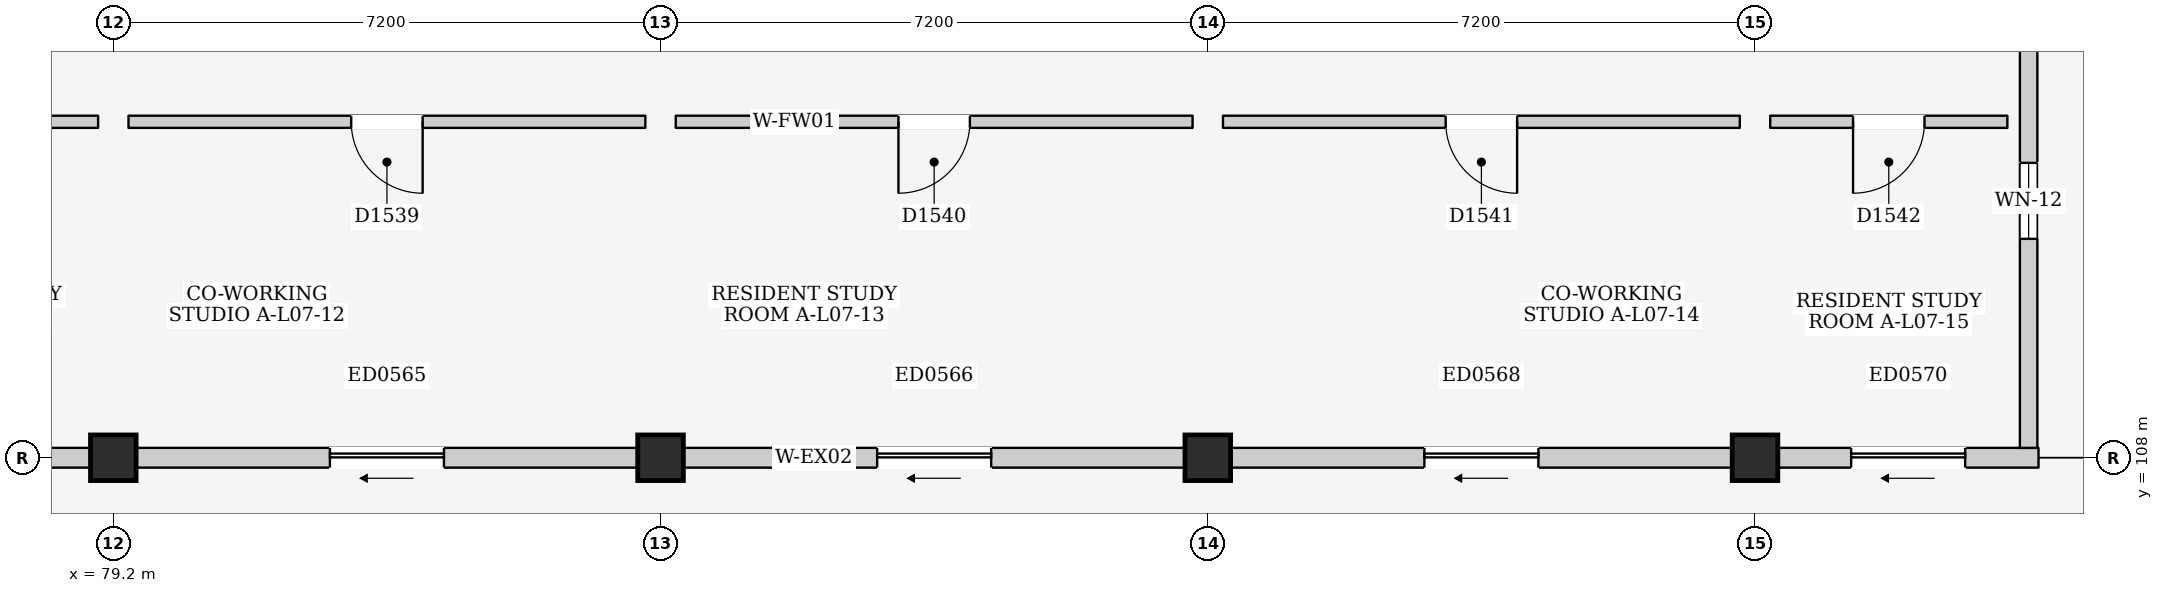
"""IFC4 building model, lengths in metres.
Left out: names, types, materials, properties, quantities, classifications, styles, units other than length and angle.
Written with IfcOpenShell. Run it as: python <this file> out.ifc"""

import sys

from ifc_helpers import new_model, si_unit, direction, frame, frame_2d, origin, origin_2d, place, context, subcontext, project, spatial, rectangle, extrude, element, fill, save


model = new_model("IFC4")
c1 = context("Model", 3, precision=1e-05, world=origin(), true_north=direction((0.0, 1.0)))
c2 = subcontext(c1, "Body", "Model", "MODEL_VIEW")
j1 = project(units=[si_unit("LENGTHUNIT", "METRE"), si_unit("PLANEANGLEUNIT", "RADIAN")], contexts=[c1])
p1 = place(None, origin())
s1 = spatial("IfcSite", under=j1, at=p1, CompositionType="ELEMENT")
p2 = place(p1, origin())
s2 = spatial("IfcBuilding", under=s1, at=p2, CompositionType="ELEMENT")
p3 = place(p2, frame((0.0, 0.0, 25.1)))
s3 = spatial("IfcBuildingStorey", under=s2, at=p3, CompositionType="ELEMENT", Elevation=25.1)
for number, where, z_axis, x_axis in (
    (1, (79.2, 108.0, 0.0), (0.0, 0.0, 1.0), (1.0, 0.0, 0.0)),
    (2, (86.4, 108.0, 0.0), (0.0, 0.0, 1.0), (1.0, 0.0, 0.0)),
    (3, (93.6, 108.0, 0.0), (0.0, 0.0, 1.0), (1.0, 0.0, 0.0)),
    (4, (100.8, 108.0, 0.0), (0.0, 0.0, 1.0), (1.0, 0.0, 0.0)),
):
    element("IfcColumn", number, at=place(p3, frame(where, z_axis=z_axis, x_axis=x_axis)), inside=s3, PredefinedType="COLUMN", context=c2, shape_type="SweptSolid", body=[
        extrude(rectangle(XDim=0.6, YDim=0.6, at=origin_2d()), origin(), (0.0, 0.0, 1.0), 3.2),
    ])
p4 = place(p3, frame((72.3, 108.0, 0.0), z_axis=(0.0, 0.0, 1.0), x_axis=(1.0, 0.0, 0.0)))
e5 = element("IfcWall", 5, at=p4, inside=s3, PredefinedType="ELEMENTEDWALL", context=c2, shape_type="SweptSolid", body=[
    extrude(rectangle(XDim=6.6, YDim=0.26, at=frame_2d((3.3, 0.0))), origin(), (0.0, 0.0, 1.0), 2.325),
])
p5 = place(p4, frame((2.55, 0.0, 0.0)))
e6 = element("IfcOpeningElement", 6, at=p5, cuts=e5, PredefinedType="OPENING", context=c2, shape_type="SweptSolid", body=[
    extrude(rectangle(XDim=1.5, YDim=2.12, at=frame_2d((0.75, 1.06))), frame((0.0, 0.145, 0.0), z_axis=(0.0, -1.0, 0.0), x_axis=(1.0, 0.0, 0.0)), (0.0, 0.0, 1.0), 0.29),
])
p6 = place(p3, frame((79.5, 108.0, 0.0), z_axis=(0.0, 0.0, 1.0), x_axis=(1.0, 0.0, 0.0)))
e7 = element("IfcWall", 7, at=p6, inside=s3, PredefinedType="ELEMENTEDWALL", context=c2, shape_type="SweptSolid", body=[
    extrude(rectangle(XDim=6.6, YDim=0.26, at=frame_2d((3.3, 0.0))), origin(), (0.0, 0.0, 1.0), 2.325),
])
p7 = place(p6, frame((2.55, 0.0, 0.0)))
e8 = element("IfcOpeningElement", 8, at=p7, cuts=e7, PredefinedType="OPENING", context=c2, shape_type="SweptSolid", body=[
    extrude(rectangle(XDim=1.5, YDim=2.12, at=frame_2d((0.75, 1.06))), frame((0.0, 0.145, 0.0), z_axis=(0.0, -1.0, 0.0), x_axis=(1.0, 0.0, 0.0)), (0.0, 0.0, 1.0), 0.29),
])
p8 = place(p3, frame((86.7, 108.0, 0.0), z_axis=(0.0, 0.0, 1.0), x_axis=(1.0, 0.0, 0.0)))
e9 = element("IfcWall", 9, at=p8, inside=s3, PredefinedType="ELEMENTEDWALL", context=c2, shape_type="SweptSolid", body=[
    extrude(rectangle(XDim=6.6, YDim=0.26, at=frame_2d((3.3, 0.0))), origin(), (0.0, 0.0, 1.0), 2.325),
])
p9 = place(p8, frame((2.55, 0.0, 0.0)))
e10 = element("IfcOpeningElement", 10, at=p9, cuts=e9, PredefinedType="OPENING", context=c2, shape_type="SweptSolid", body=[
    extrude(rectangle(XDim=1.5, YDim=2.12, at=frame_2d((0.75, 1.06))), frame((0.0, 0.145, 0.0), z_axis=(0.0, -1.0, 0.0), x_axis=(1.0, 0.0, 0.0)), (0.0, 0.0, 1.0), 0.29),
])
p10 = place(p3, frame((93.9, 108.0, 0.0), z_axis=(0.0, 0.0, 1.0), x_axis=(1.0, 0.0, 0.0)))
e11 = element("IfcWall", 11, at=p10, inside=s3, PredefinedType="ELEMENTEDWALL", context=c2, shape_type="SweptSolid", body=[
    extrude(rectangle(XDim=6.6, YDim=0.26, at=frame_2d((3.3, 0.0))), origin(), (0.0, 0.0, 1.0), 2.325),
])
p11 = place(p10, frame((2.55, 0.0, 0.0)))
e12 = element("IfcOpeningElement", 12, at=p11, cuts=e11, PredefinedType="OPENING", context=c2, shape_type="SweptSolid", body=[
    extrude(rectangle(XDim=1.5, YDim=2.12, at=frame_2d((0.75, 1.06))), frame((0.0, 0.145, 0.0), z_axis=(0.0, -1.0, 0.0), x_axis=(1.0, 0.0, 0.0)), (0.0, 0.0, 1.0), 0.29),
])
p12 = place(p3, frame((101.1, 108.0, 0.0), z_axis=(0.0, 0.0, 1.0), x_axis=(1.0, 0.0, 0.0)))
e13 = element("IfcWall", 13, at=p12, inside=s3, PredefinedType="ELEMENTEDWALL", context=c2, shape_type="SweptSolid", body=[
    extrude(rectangle(XDim=3.43, YDim=0.26, at=frame_2d((1.715, 0.0))), origin(), (0.0, 0.0, 1.0), 2.325),
])
p13 = place(p12, frame((0.965, 0.0, 0.0)))
e14 = element("IfcOpeningElement", 14, at=p13, cuts=e13, PredefinedType="OPENING", context=c2, shape_type="SweptSolid", body=[
    extrude(rectangle(XDim=1.5, YDim=2.12, at=frame_2d((0.75, 1.06))), frame((0.0, 0.145, 0.0), z_axis=(0.0, -1.0, 0.0), x_axis=(1.0, 0.0, 0.0)), (0.0, 0.0, 1.0), 0.29),
])
p14 = place(p3, frame((104.4, 108.13, 0.0), z_axis=(0.0, 0.0, 1.0), x_axis=(0.0, 1.0, 0.0)))
e15 = element("IfcWall", 15, at=p14, inside=s3, PredefinedType="ELEMENTEDWALL", context=c2, shape_type="SweptSolid", body=[
    extrude(rectangle(XDim=7.07, YDim=0.23, at=frame_2d((3.535, 0.0))), origin(), (0.0, 0.0, 1.0), 2.425),
])
p15 = place(p14, frame((2.75, 0.0, 1.1)))
e16 = element("IfcOpeningElement", 16, at=p15, cuts=e15, PredefinedType="OPENING", context=c2, shape_type="SweptSolid", body=[
    extrude(rectangle(XDim=1.0, YDim=0.9, at=frame_2d((0.5, 0.45))), frame((0.0, 0.13, 0.0), z_axis=(0.0, -1.0, 0.0), x_axis=(1.0, 0.0, 0.0)), (0.0, 0.0, 1.0), 0.26),
])
p16 = place(p3, frame((72.2, 112.42, 0.0), z_axis=(0.0, 0.0, 1.0), x_axis=(1.0, 0.0, 0.0)))
e17 = element("IfcWall", 17, at=p16, inside=s3, PredefinedType="PARTITIONING", context=c2, shape_type="SweptSolid", body=[
    extrude(rectangle(XDim=6.8, YDim=0.16, at=frame_2d((3.4, 0.0))), origin(), (0.0, 0.0, 1.0), 2.99),
])
p17 = place(p16, frame((2.93, 0.0, 0.0)))
e18 = element("IfcOpeningElement", 18, at=p17, cuts=e17, PredefinedType="OPENING", context=c2, shape_type="SweptSolid", body=[
    extrude(rectangle(XDim=0.94, YDim=2.12, at=frame_2d((0.47, 1.06))), frame((0.0, 0.095, 0.0), z_axis=(0.0, -1.0, 0.0), x_axis=(1.0, 0.0, 0.0)), (0.0, 0.0, 1.0), 0.19),
])
p18 = place(p3, frame((79.4, 112.42, 0.0), z_axis=(0.0, 0.0, 1.0), x_axis=(1.0, 0.0, 0.0)))
e19 = element("IfcWall", 19, at=p18, inside=s3, PredefinedType="PARTITIONING", context=c2, shape_type="SweptSolid", body=[
    extrude(rectangle(XDim=6.8, YDim=0.16, at=frame_2d((3.4, 0.0))), origin(), (0.0, 0.0, 1.0), 2.99),
])
p19 = place(p18, frame((2.93, 0.0, 0.0)))
e20 = element("IfcOpeningElement", 20, at=p19, cuts=e19, PredefinedType="OPENING", context=c2, shape_type="SweptSolid", body=[
    extrude(rectangle(XDim=0.94, YDim=2.12, at=frame_2d((0.47, 1.06))), frame((0.0, 0.095, 0.0), z_axis=(0.0, -1.0, 0.0), x_axis=(1.0, 0.0, 0.0)), (0.0, 0.0, 1.0), 0.19),
])
p20 = place(p3, frame((86.6, 112.42, 0.0), z_axis=(0.0, 0.0, 1.0), x_axis=(1.0, 0.0, 0.0)))
e21 = element("IfcWall", 21, at=p20, inside=s3, PredefinedType="PARTITIONING", context=c2, shape_type="SweptSolid", body=[
    extrude(rectangle(XDim=6.8, YDim=0.16, at=frame_2d((3.4, 0.0))), origin(), (0.0, 0.0, 1.0), 2.99),
])
p21 = place(p20, frame((2.93, 0.0, 0.0)))
e22 = element("IfcOpeningElement", 22, at=p21, cuts=e21, PredefinedType="OPENING", context=c2, shape_type="SweptSolid", body=[
    extrude(rectangle(XDim=0.94, YDim=2.12, at=frame_2d((0.47, 1.06))), frame((0.0, 0.095, 0.0), z_axis=(0.0, -1.0, 0.0), x_axis=(1.0, 0.0, 0.0)), (0.0, 0.0, 1.0), 0.19),
])
p22 = place(p3, frame((93.8, 112.42, 0.0), z_axis=(0.0, 0.0, 1.0), x_axis=(1.0, 0.0, 0.0)))
e23 = element("IfcWall", 23, at=p22, inside=s3, PredefinedType="PARTITIONING", context=c2, shape_type="SweptSolid", body=[
    extrude(rectangle(XDim=6.8, YDim=0.16, at=frame_2d((3.4, 0.0))), origin(), (0.0, 0.0, 1.0), 2.99),
])
p23 = place(p22, frame((2.93, 0.0, 0.0)))
e24 = element("IfcOpeningElement", 24, at=p23, cuts=e23, PredefinedType="OPENING", context=c2, shape_type="SweptSolid", body=[
    extrude(rectangle(XDim=0.94, YDim=2.12, at=frame_2d((0.47, 1.06))), frame((0.0, 0.095, 0.0), z_axis=(0.0, -1.0, 0.0), x_axis=(1.0, 0.0, 0.0)), (0.0, 0.0, 1.0), 0.19),
])
p24 = place(p3, frame((101.0, 112.42, 0.0), z_axis=(0.0, 0.0, 1.0), x_axis=(1.0, 0.0, 0.0)))
e25 = element("IfcWall", 25, at=p24, inside=s3, PredefinedType="PARTITIONING", context=c2, shape_type="SweptSolid", body=[
    extrude(rectangle(XDim=3.12, YDim=0.16, at=frame_2d((1.56, 0.0))), origin(), (0.0, 0.0, 1.0), 2.99),
])
p25 = place(p24, frame((1.09, 0.0, 0.0)))
e26 = element("IfcOpeningElement", 26, at=p25, cuts=e25, PredefinedType="OPENING", context=c2, shape_type="SweptSolid", body=[
    extrude(rectangle(XDim=0.94, YDim=2.12, at=frame_2d((0.47, 1.06))), frame((0.0, 0.095, 0.0), z_axis=(0.0, -1.0, 0.0), x_axis=(1.0, 0.0, 0.0)), (0.0, 0.0, 1.0), 0.19),
])
p26 = place(p7, frame((1.5, 0.0, 0.0), z_axis=(0.0, 0.0, 1.0), x_axis=(-1.0, 0.0, 0.0)))
e27 = element("IfcDoor", 27, at=p26, inside=s3, OperationType="SLIDING_TO_LEFT", PredefinedType="DOOR", context=c2, shape_type="SweptSolid", body=[
    extrude(rectangle(XDim=1.5, YDim=2.12, at=frame_2d((0.75, 1.06))), frame((0.0, 0.025, 0.0), z_axis=(0.0, -1.0, 0.0), x_axis=(1.0, 0.0, 0.0)), (0.0, 0.0, 1.0), 0.05),
])
fill(e8, e27)
p27 = place(p9, frame((1.5, 0.0, 0.0), z_axis=(0.0, 0.0, 1.0), x_axis=(-1.0, 0.0, 0.0)))
e28 = element("IfcDoor", 28, at=p27, inside=s3, OperationType="SLIDING_TO_LEFT", PredefinedType="DOOR", context=c2, shape_type="SweptSolid", body=[
    extrude(rectangle(XDim=1.5, YDim=2.12, at=frame_2d((0.75, 1.06))), frame((0.0, 0.025, 0.0), z_axis=(0.0, -1.0, 0.0), x_axis=(1.0, 0.0, 0.0)), (0.0, 0.0, 1.0), 0.05),
])
fill(e10, e28)
p28 = place(p11, frame((1.5, 0.0, 0.0), z_axis=(0.0, 0.0, 1.0), x_axis=(-1.0, 0.0, 0.0)))
e29 = element("IfcDoor", 29, at=p28, inside=s3, OperationType="SLIDING_TO_LEFT", PredefinedType="DOOR", context=c2, shape_type="SweptSolid", body=[
    extrude(rectangle(XDim=1.5, YDim=2.12, at=frame_2d((0.75, 1.06))), frame((0.0, 0.025, 0.0), z_axis=(0.0, -1.0, 0.0), x_axis=(1.0, 0.0, 0.0)), (0.0, 0.0, 1.0), 0.05),
])
fill(e12, e29)
p29 = place(p13, frame((1.5, 0.0, 0.0), z_axis=(0.0, 0.0, 1.0), x_axis=(-1.0, 0.0, 0.0)))
e30 = element("IfcDoor", 30, at=p29, inside=s3, OperationType="SLIDING_TO_LEFT", PredefinedType="DOOR", context=c2, shape_type="SweptSolid", body=[
    extrude(rectangle(XDim=1.5, YDim=2.12, at=frame_2d((0.75, 1.06))), frame((0.0, 0.025, 0.0), z_axis=(0.0, -1.0, 0.0), x_axis=(1.0, 0.0, 0.0)), (0.0, 0.0, 1.0), 0.05),
])
fill(e14, e30)
p30 = place(p15, origin())
e31 = element("IfcWindow", 31, at=p30, inside=s3, PartitioningType="SINGLE_PANEL", PredefinedType="WINDOW", context=c2, shape_type="SweptSolid", body=[
    extrude(rectangle(XDim=1.0, YDim=0.9, at=frame_2d((0.5, 0.45))), frame((0.0, 0.03, 0.0), z_axis=(0.0, -1.0, 0.0), x_axis=(1.0, 0.0, 0.0)), (0.0, 0.0, 1.0), 0.06),
])
fill(e16, e31)
p31 = place(p19, frame((0.94, 0.0, 0.0), z_axis=(0.0, 0.0, 1.0), x_axis=(-1.0, 0.0, 0.0)))
e32 = element("IfcDoor", 32, at=p31, inside=s3, OperationType="SINGLE_SWING_LEFT", PredefinedType="DOOR", context=c2, shape_type="SweptSolid", body=[
    extrude(rectangle(XDim=0.94, YDim=2.12, at=frame_2d((0.47, 1.06))), frame((0.0, 0.025, 0.0), z_axis=(0.0, -1.0, 0.0), x_axis=(1.0, 0.0, 0.0)), (0.0, 0.0, 1.0), 0.05),
])
fill(e20, e32)
p32 = place(p21, frame((0.94, 0.0, 0.0), z_axis=(0.0, 0.0, 1.0), x_axis=(-1.0, 0.0, 0.0)))
e33 = element("IfcDoor", 33, at=p32, inside=s3, OperationType="SINGLE_SWING_RIGHT", PredefinedType="DOOR", context=c2, shape_type="SweptSolid", body=[
    extrude(rectangle(XDim=0.94, YDim=2.12, at=frame_2d((0.47, 1.06))), frame((0.0, 0.025, 0.0), z_axis=(0.0, -1.0, 0.0), x_axis=(1.0, 0.0, 0.0)), (0.0, 0.0, 1.0), 0.05),
])
fill(e22, e33)
p33 = place(p23, frame((0.94, 0.0, 0.0), z_axis=(0.0, 0.0, 1.0), x_axis=(-1.0, 0.0, 0.0)))
e34 = element("IfcDoor", 34, at=p33, inside=s3, OperationType="SINGLE_SWING_LEFT", PredefinedType="DOOR", context=c2, shape_type="SweptSolid", body=[
    extrude(rectangle(XDim=0.94, YDim=2.12, at=frame_2d((0.47, 1.06))), frame((0.0, 0.025, 0.0), z_axis=(0.0, -1.0, 0.0), x_axis=(1.0, 0.0, 0.0)), (0.0, 0.0, 1.0), 0.05),
])
fill(e24, e34)
p34 = place(p25, frame((0.94, 0.0, 0.0), z_axis=(0.0, 0.0, 1.0), x_axis=(-1.0, 0.0, 0.0)))
e35 = element("IfcDoor", 35, at=p34, inside=s3, OperationType="SINGLE_SWING_RIGHT", PredefinedType="DOOR", context=c2, shape_type="SweptSolid", body=[
    extrude(rectangle(XDim=0.94, YDim=2.12, at=frame_2d((0.47, 1.06))), frame((0.0, 0.025, 0.0), z_axis=(0.0, -1.0, 0.0), x_axis=(1.0, 0.0, 0.0)), (0.0, 0.0, 1.0), 0.05),
])
fill(e26, e35)
save(model, sys.argv[1])
